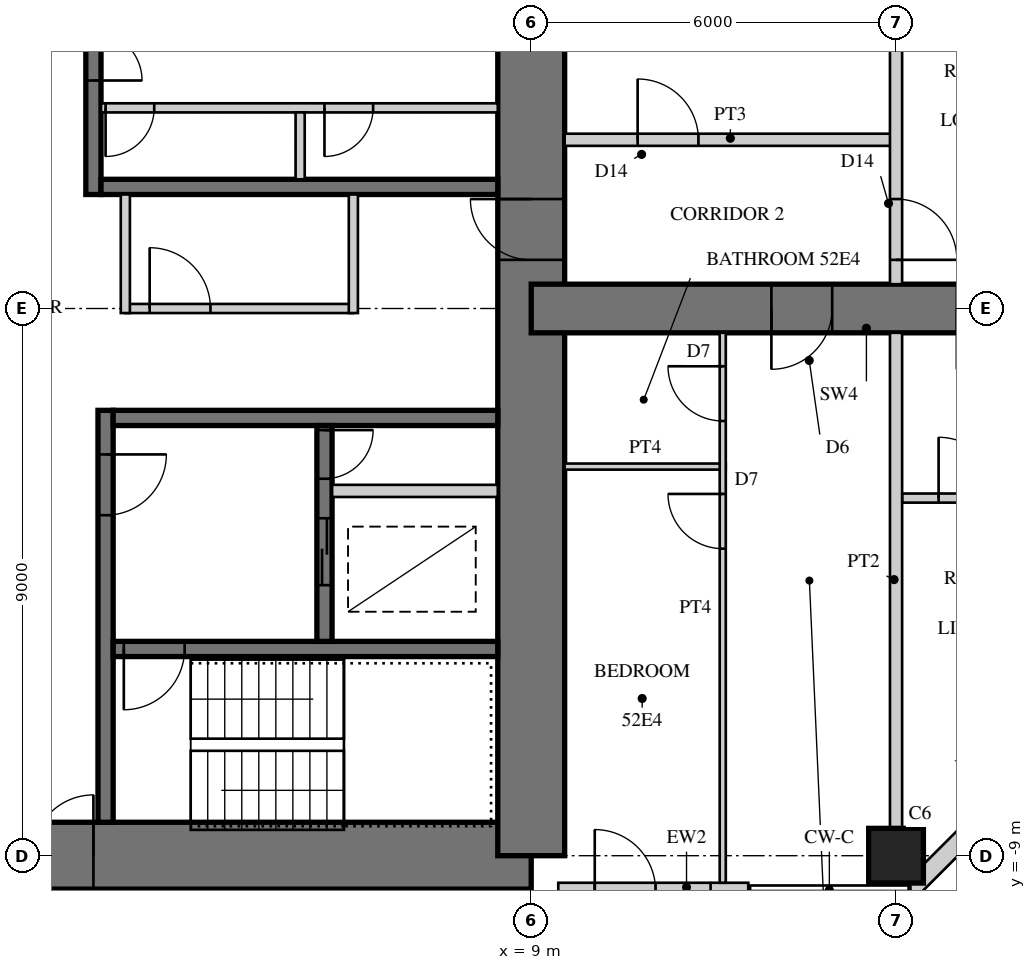
"""IFC4 building model, lengths in metres.
Left out: names, types, materials, properties, quantities, classifications, styles, units other than length and angle.
Written with IfcOpenShell. Run it as: python <this file> out.ifc"""

import sys

from ifc_helpers import new_model, si_unit, direction, frame, frame_2d, origin, origin_2d, place, context, subcontext, project, spatial, rectangle, hollow_rectangle, extrude, element, fill, save


model = new_model("IFC4")
c1 = context("Model", 3, precision=1e-05, world=origin(), true_north=direction((0.0, 1.0)))
c2 = subcontext(c1, "Body", "Model", "MODEL_VIEW")
j1 = project(units=[si_unit("LENGTHUNIT", "METRE"), si_unit("PLANEANGLEUNIT", "RADIAN")], contexts=[c1])
p1 = place(None, origin())
s1 = spatial("IfcSite", under=j1, at=p1, CompositionType="ELEMENT")
p2 = place(p1, origin())
s2 = spatial("IfcBuilding", under=s1, at=p2, CompositionType="ELEMENT")
p3 = place(p2, frame((0.0, 0.0, 206.9)))
s3 = spatial("IfcBuildingStorey", under=s2, at=p3, CompositionType="ELEMENT", Elevation=206.9)
p4 = place(p3, frame((-9.0, -9.0, 0.0), z_axis=(0.0, 0.0, 1.0), x_axis=(1.0, 0.0, 0.0)))
e1 = element("IfcWall", 1, at=p4, inside=s3, PredefinedType="SHEAR", context=c2, shape_type="SweptSolid", body=[
    extrude(rectangle(XDim=18.0, YDim=1.1, at=frame_2d((9.0, 0.0))), origin(), (0.0, 0.0, 1.0), 3.4),
])
p5 = place(p4, frame((9.8, 0.0, 0.0)))
e2 = element("IfcOpeningElement", 2, at=p5, cuts=e1, PredefinedType="OPENING", context=c2, shape_type="SweptSolid", body=[
    extrude(rectangle(XDim=1.0, YDim=2.4, at=frame_2d((0.5, 1.2))), frame((0.0, 0.56, 0.0), z_axis=(0.0, -1.0, 0.0), x_axis=(1.0, 0.0, 0.0)), (0.0, 0.0, 1.0), 1.12),
])
p6 = place(p3, frame((9.0, -9.0, 0.0), z_axis=(0.0, 0.0, 1.0), x_axis=(0.0, 1.0, 0.0)))
e3 = element("IfcWall", 3, at=p6, inside=s3, PredefinedType="SHEAR", context=c2, shape_type="SweptSolid", body=[
    extrude(rectangle(XDim=18.0, YDim=1.1, at=frame_2d((9.0, 0.0))), origin(), (0.0, 0.0, 1.0), 3.4),
])
p7 = place(p6, frame((9.8, 0.0, 0.0)))
e4 = element("IfcOpeningElement", 4, at=p7, cuts=e3, PredefinedType="OPENING", context=c2, shape_type="SweptSolid", body=[
    extrude(rectangle(XDim=1.0, YDim=2.4, at=frame_2d((0.5, 1.2))), frame((0.0, 0.56, 0.0), z_axis=(0.0, -1.0, 0.0), x_axis=(1.0, 0.0, 0.0)), (0.0, 0.0, 1.0), 1.12),
])
p8 = place(p3, frame((1.8, 1.875, 0.0), z_axis=(0.0, 0.0, 1.0), x_axis=(0.0, 1.0, 0.0)))
e5 = element("IfcWall", 5, at=p8, inside=s3, PredefinedType="SHEAR", context=c2, shape_type="SweptSolid", body=[
    extrude(rectangle(XDim=6.575, YDim=0.25, at=frame_2d((3.288, 0.0))), origin(), (0.0, 0.0, 1.0), 3.4),
])
p9 = place(p8, frame((1.875, 0.0, 0.0)))
e6 = element("IfcOpeningElement", 6, at=p9, cuts=e5, PredefinedType="OPENING", context=c2, shape_type="SweptSolid", body=[
    extrude(rectangle(XDim=1.6, YDim=2.4, at=frame_2d((0.8, 1.2))), frame((0.0, 0.135, 0.0), z_axis=(0.0, -1.0, 0.0), x_axis=(1.0, 0.0, 0.0)), (0.0, 0.0, 1.0), 0.27),
])
p10 = place(p3, frame((1.925, 2.0, 0.0), z_axis=(0.0, 0.0, 1.0), x_axis=(1.0, 0.0, 0.0)))
e7 = element("IfcWall", 7, at=p10, inside=s3, PredefinedType="SHEAR", context=c2, shape_type="SweptSolid", body=[
    extrude(rectangle(XDim=6.525, YDim=0.25, at=frame_2d((3.262, 0.0))), origin(), (0.0, 0.0, 1.0), 3.4),
])
p11 = place(p3, frame((1.925, 3.3, 0.0), z_axis=(0.0, 0.0, 1.0), x_axis=(1.0, 0.0, 0.0)))
e8 = element("IfcWall", 8, at=p11, inside=s3, PredefinedType="PARTITIONING", context=c2, shape_type="SweptSolid", body=[
    extrude(rectangle(XDim=6.525, YDim=0.15, at=frame_2d((3.262, 0.0))), origin(), (0.0, 0.0, 1.0), 3.4),
])
p12 = place(p11, frame((0.075, 0.0, 0.0)))
e9 = element("IfcOpeningElement", 9, at=p12, cuts=e8, PredefinedType="OPENING", context=c2, shape_type="SweptSolid", body=[
    extrude(rectangle(XDim=0.8, YDim=2.1, at=frame_2d((0.4, 1.05))), frame((0.0, 0.085, 0.0), z_axis=(0.0, -1.0, 0.0), x_axis=(1.0, 0.0, 0.0)), (0.0, 0.0, 1.0), 0.17),
])
p13 = place(p11, frame((3.675, 0.0, 0.0)))
e10 = element("IfcOpeningElement", 10, at=p13, cuts=e8, PredefinedType="OPENING", context=c2, shape_type="SweptSolid", body=[
    extrude(rectangle(XDim=0.8, YDim=2.1, at=frame_2d((0.4, 1.05))), frame((0.0, 0.085, 0.0), z_axis=(0.0, -1.0, 0.0), x_axis=(1.0, 0.0, 0.0)), (0.0, 0.0, 1.0), 0.17),
])
p14 = place(p3, frame((5.2, 2.125, 0.0), z_axis=(0.0, 0.0, 1.0), x_axis=(0.0, 1.0, 0.0)))
e11 = element("IfcWall", 11, at=p14, inside=s3, PredefinedType="PARTITIONING", context=c2, shape_type="SweptSolid", body=[
    extrude(rectangle(XDim=1.1, YDim=0.15, at=frame_2d((0.55, 0.0))), origin(), (0.0, 0.0, 1.0), 3.4),
])
p15 = place(p3, frame((2.0, -1.675, 0.0), z_axis=(0.0, 0.0, 1.0), x_axis=(0.0, -1.0, 0.0)))
e12 = element("IfcWall", 12, at=p15, inside=s3, PredefinedType="SHEAR", context=c2, shape_type="SweptSolid", body=[
    extrude(rectangle(XDim=6.775, YDim=0.25, at=frame_2d((3.387, 0.0))), origin(), (0.0, 0.0, 1.0), 3.4),
])
p16 = place(p15, frame((0.725, 0.0, 0.0)))
e13 = element("IfcOpeningElement", 13, at=p16, cuts=e12, PredefinedType="OPENING", context=c2, shape_type="SweptSolid", body=[
    extrude(rectangle(XDim=1.0, YDim=2.1, at=frame_2d((0.5, 1.05))), frame((0.0, 0.135, 0.0), z_axis=(0.0, -1.0, 0.0), x_axis=(1.0, 0.0, 0.0)), (0.0, 0.0, 1.0), 0.27),
])
p17 = place(p3, frame((2.125, -1.8, 0.0), z_axis=(0.0, 0.0, 1.0), x_axis=(1.0, 0.0, 0.0)))
e14 = element("IfcWall", 14, at=p17, inside=s3, PredefinedType="SHEAR", context=c2, shape_type="SweptSolid", body=[
    extrude(rectangle(XDim=6.325, YDim=0.25, at=frame_2d((3.163, 0.0))), origin(), (0.0, 0.0, 1.0), 3.4),
])
p18 = place(p3, frame((2.125, -5.6, 0.0), z_axis=(0.0, 0.0, 1.0), x_axis=(1.0, 0.0, 0.0)))
e15 = element("IfcWall", 15, at=p18, inside=s3, PredefinedType="SHEAR", context=c2, shape_type="SweptSolid", body=[
    extrude(rectangle(XDim=6.325, YDim=0.25, at=frame_2d((3.163, 0.0))), origin(), (0.0, 0.0, 1.0), 3.4),
])
p19 = place(p18, frame((0.175, 0.0, 0.0)))
e16 = element("IfcOpeningElement", 16, at=p19, cuts=e15, PredefinedType="OPENING", context=c2, shape_type="SweptSolid", body=[
    extrude(rectangle(XDim=1.0, YDim=2.1, at=frame_2d((0.5, 1.05))), frame((0.0, 0.135, 0.0), z_axis=(0.0, -1.0, 0.0), x_axis=(1.0, 0.0, 0.0)), (0.0, 0.0, 1.0), 0.27),
])
p20 = place(p3, frame((5.6, -1.925, 0.0), z_axis=(0.0, 0.0, 1.0), x_axis=(0.0, -1.0, 0.0)))
e17 = element("IfcWall", 17, at=p20, inside=s3, PredefinedType="SHEAR", context=c2, shape_type="SweptSolid", body=[
    extrude(rectangle(XDim=3.55, YDim=0.25, at=frame_2d((1.775, 0.0))), origin(), (0.0, 0.0, 1.0), 3.4),
])
p21 = place(p20, frame((1.525, 0.0, 0.0)))
e18 = element("IfcOpeningElement", 18, at=p21, cuts=e17, PredefinedType="OPENING", context=c2, shape_type="SweptSolid", body=[
    extrude(rectangle(XDim=1.1, YDim=2.2, at=frame_2d((0.55, 1.1))), frame((0.0, 0.135, 0.0), z_axis=(0.0, -1.0, 0.0), x_axis=(1.0, 0.0, 0.0)), (0.0, 0.0, 1.0), 0.27),
])
p22 = place(p20, frame((0.075, 0.0, 0.0)))
e19 = element("IfcOpeningElement", 19, at=p22, cuts=e17, PredefinedType="OPENING", context=c2, shape_type="SweptSolid", body=[
    extrude(rectangle(XDim=0.8, YDim=2.1, at=frame_2d((0.4, 1.05))), frame((0.0, 0.135, 0.0), z_axis=(0.0, -1.0, 0.0), x_axis=(1.0, 0.0, 0.0)), (0.0, 0.0, 1.0), 0.27),
])
p23 = place(p3, frame((5.725, -3.0, 0.0), z_axis=(0.0, 0.0, 1.0), x_axis=(1.0, 0.0, 0.0)))
e20 = element("IfcWall", 20, at=p23, inside=s3, PredefinedType="PARTITIONING", context=c2, shape_type="SweptSolid", body=[
    extrude(rectangle(XDim=2.725, YDim=0.2, at=frame_2d((1.362, 0.0))), origin(), (0.0, 0.0, 1.0), 3.4),
])
p24 = place(p3, frame((9.0, 0.0, 0.0), z_axis=(0.0, 0.0, 1.0), x_axis=(1.0, 0.0, 0.0)))
e21 = element("IfcWall", 21, at=p24, inside=s3, PredefinedType="SHEAR", context=c2, shape_type="SweptSolid", body=[
    extrude(rectangle(XDim=9.0, YDim=0.8, at=frame_2d((4.5, 0.0))), origin(), (0.0, 0.0, 1.0), 3.4),
])
p25 = place(p24, frame((3.95, 0.0, 0.0)))
e22 = element("IfcOpeningElement", 22, at=p25, cuts=e21, PredefinedType="OPENING", context=c2, shape_type="SweptSolid", body=[
    extrude(rectangle(XDim=1.0, YDim=2.15, at=frame_2d((0.5, 1.075))), frame((0.0, 0.41, 0.0), z_axis=(0.0, -1.0, 0.0), x_axis=(1.0, 0.0, 0.0)), (0.0, 0.0, 1.0), 0.82),
])
p26 = place(p24, frame((7.0, 0.0, 0.0)))
e23 = element("IfcOpeningElement", 23, at=p26, cuts=e21, PredefinedType="OPENING", context=c2, shape_type="SweptSolid", body=[
    extrude(rectangle(XDim=1.0, YDim=2.2, at=frame_2d((0.5, 1.1))), frame((0.0, 0.41, 0.0), z_axis=(0.0, -1.0, 0.0), x_axis=(1.0, 0.0, 0.0)), (0.0, 0.0, 1.0), 0.82),
])
p27 = place(p3, frame((15.0, -9.0, 0.0), z_axis=(0.0, 0.0, 1.0), x_axis=(1.0, 0.0, 0.0)))
e24 = element("IfcColumn", 24, at=p27, inside=s3, PredefinedType="COLUMN", context=c2, shape_type="SweptSolid", body=[
    extrude(rectangle(XDim=0.9, YDim=0.9, at=origin_2d()), origin(), (0.0, 0.0, 1.0), 3.4),
])
p28 = place(p3, frame((9.445, -9.57, 0.0), z_axis=(0.0, 0.0, 1.0), x_axis=(1.0, 0.0, 0.0)))
e25 = element("IfcWall", 25, at=p28, inside=s3, PredefinedType="SOLIDWALL", context=c2, shape_type="SweptSolid", body=[
    extrude(rectangle(XDim=3.125, YDim=0.25, at=frame_2d((1.562, 0.0))), origin(), (0.0, 0.0, 1.0), 3.22),
])
p29 = place(p28, frame((0.6, 0.0, 0.0)))
e26 = element("IfcOpeningElement", 26, at=p29, cuts=e25, PredefinedType="OPENING", context=c2, shape_type="SweptSolid", body=[
    extrude(rectangle(XDim=1.0, YDim=2.2, at=frame_2d((0.5, 1.1))), frame((0.0, 0.135, 0.0), z_axis=(0.0, -1.0, 0.0), x_axis=(1.0, 0.0, 0.0)), (0.0, 0.0, 1.0), 0.27),
])
p30 = place(p3, frame((15.236, -9.57, 0.0), z_axis=(0.0, 0.0, 1.0), x_axis=(0.707106781187, 0.707106781187, 0.0)))
e27 = element("IfcWall", 27, at=p30, inside=s3, PredefinedType="SOLIDWALL", context=c2, shape_type="SweptSolid", body=[
    extrude(rectangle(XDim=4.715, YDim=0.3, at=frame_2d((2.357, 0.0))), origin(), (0.0, 0.0, 1.0), 3.22),
])
p31 = place(p30, frame((1.907, 0.0, 0.3)))
e28 = element("IfcOpeningElement", 28, at=p31, cuts=e27, PredefinedType="OPENING", context=c2, shape_type="SweptSolid", body=[
    extrude(rectangle(XDim=0.9, YDim=2.4, at=frame_2d((0.45, 1.2))), frame((0.0, 0.16, 0.0), z_axis=(0.0, -1.0, 0.0), x_axis=(1.0, 0.0, 0.0)), (0.0, 0.0, 1.0), 0.32),
])
p32 = place(p3, frame((2.325, 0.0, 0.0), z_axis=(0.0, 0.0, 1.0), x_axis=(1.0, 0.0, 0.0)))
e29 = element("IfcWall", 29, at=p32, inside=s3, PredefinedType="PARTITIONING", context=c2, shape_type="SweptSolid", body=[
    extrude(rectangle(XDim=3.75, YDim=0.15, at=frame_2d((1.875, 0.0))), origin(), (0.0, 0.0, 1.0), 3.22),
])
p33 = place(p32, frame((0.4, 0.0, 0.0)))
e30 = element("IfcOpeningElement", 30, at=p33, cuts=e29, PredefinedType="OPENING", context=c2, shape_type="SweptSolid", body=[
    extrude(rectangle(XDim=1.0, YDim=2.1, at=frame_2d((0.5, 1.05))), frame((0.0, 0.085, 0.0), z_axis=(0.0, -1.0, 0.0), x_axis=(1.0, 0.0, 0.0)), (0.0, 0.0, 1.0), 0.17),
])
for number, where, z_axis, x_axis in (
    (31, (2.325, 1.875, 0.0), (0.0, 0.0, 1.0), (0.0, -1.0, 0.0)),
    (32, (6.075, -0.075, 0.0), (0.0, 0.0, 1.0), (0.0, 1.0, 0.0)),
):
    element("IfcWall", number, at=place(p3, frame(where, z_axis=z_axis, x_axis=x_axis)), inside=s3, PredefinedType="PARTITIONING", context=c2, shape_type="SweptSolid", body=[
        extrude(rectangle(XDim=1.95, YDim=0.15, at=frame_2d((0.975, 0.0))), origin(), (0.0, 0.0, 1.0), 3.22),
    ])
p34 = place(p3, frame((9.55, -2.6, 0.0), z_axis=(0.0, 0.0, 1.0), x_axis=(1.0, 0.0, 0.0)))
e33 = element("IfcWall", 33, at=p34, inside=s3, PredefinedType="PARTITIONING", context=c2, shape_type="SweptSolid", body=[
    extrude(rectangle(XDim=2.65, YDim=0.1, at=frame_2d((1.325, 0.0))), origin(), (0.0, 0.0, 1.0), 3.22),
])
p35 = place(p3, frame((12.15, -9.445, 0.0), z_axis=(0.0, 0.0, 1.0), x_axis=(0.0, 1.0, 0.0)))
e34 = element("IfcWall", 34, at=p35, inside=s3, PredefinedType="PARTITIONING", context=c2, shape_type="SweptSolid", body=[
    extrude(rectangle(XDim=9.045, YDim=0.1, at=frame_2d((4.522, 0.0))), origin(), (0.0, 0.0, 1.0), 3.22),
])
p36 = place(p35, frame((5.495, 0.0, 0.0)))
e35 = element("IfcOpeningElement", 35, at=p36, cuts=e34, PredefinedType="OPENING", context=c2, shape_type="SweptSolid", body=[
    extrude(rectangle(XDim=0.9, YDim=2.1, at=frame_2d((0.45, 1.05))), frame((0.0, 0.06, 0.0), z_axis=(0.0, -1.0, 0.0), x_axis=(1.0, 0.0, 0.0)), (0.0, 0.0, 1.0), 0.12),
])
p37 = place(p35, frame((7.595, 0.0, 0.0)))
e36 = element("IfcOpeningElement", 36, at=p37, cuts=e34, PredefinedType="OPENING", context=c2, shape_type="SweptSolid", body=[
    extrude(rectangle(XDim=0.9, YDim=2.1, at=frame_2d((0.45, 1.05))), frame((0.0, 0.06, 0.0), z_axis=(0.0, -1.0, 0.0), x_axis=(1.0, 0.0, 0.0)), (0.0, 0.0, 1.0), 0.12),
])
p38 = place(p3, frame((9.55, 2.775, 0.0), z_axis=(0.0, 0.0, 1.0), x_axis=(1.0, 0.0, 0.0)))
e37 = element("IfcWall", 37, at=p38, inside=s3, PredefinedType="SOLIDWALL", context=c2, shape_type="SweptSolid", body=[
    extrude(rectangle(XDim=5.45, YDim=0.2, at=frame_2d((2.725, 0.0))), origin(), (0.0, 0.0, 1.0), 3.22),
])
p39 = place(p38, frame((1.2, 0.0, 0.0)))
e38 = element("IfcOpeningElement", 38, at=p39, cuts=e37, PredefinedType="OPENING", context=c2, shape_type="SweptSolid", body=[
    extrude(rectangle(XDim=1.0, YDim=2.2, at=frame_2d((0.5, 1.1))), frame((0.0, 0.11, 0.0), z_axis=(0.0, -1.0, 0.0), x_axis=(1.0, 0.0, 0.0)), (0.0, 0.0, 1.0), 0.22),
])
p40 = place(p3, frame((15.1, -3.118, 0.0), z_axis=(0.0, 0.0, 1.0), x_axis=(1.0, 0.0, 0.0)))
e39 = element("IfcWall", 39, at=p40, inside=s3, PredefinedType="PARTITIONING", context=c2, shape_type="SweptSolid", body=[
    extrude(rectangle(XDim=3.43, YDim=0.15, at=frame_2d((1.715, 0.0))), origin(), (0.0, 0.0, 1.0), 3.22),
])
p41 = place(p40, frame((0.6, 0.0, 0.0)))
e40 = element("IfcOpeningElement", 40, at=p41, cuts=e39, PredefinedType="OPENING", context=c2, shape_type="SweptSolid", body=[
    extrude(rectangle(XDim=1.0, YDim=2.1, at=frame_2d((0.5, 1.05))), frame((0.0, 0.085, 0.0), z_axis=(0.0, -1.0, 0.0), x_axis=(1.0, 0.0, 0.0)), (0.0, 0.0, 1.0), 0.17),
])
p42 = place(p3, frame((15.0, -8.55, 0.0), z_axis=(0.0, 0.0, 1.0), x_axis=(0.0, 1.0, 0.0)))
e41 = element("IfcWall", 41, at=p42, inside=s3, PredefinedType="SOLIDWALL", context=c2, shape_type="SweptSolid", body=[
    extrude(rectangle(XDim=8.15, YDim=0.2, at=frame_2d((4.075, 0.0))), origin(), (0.0, 0.0, 1.0), 2.47),
])
p43 = place(p3, frame((15.0, 0.4, 0.0), z_axis=(0.0, 0.0, 1.0), x_axis=(0.0, 1.0, 0.0)))
e42 = element("IfcWall", 42, at=p43, inside=s3, PredefinedType="SOLIDWALL", context=c2, shape_type="SweptSolid", body=[
    extrude(rectangle(XDim=8.15, YDim=0.2, at=frame_2d((4.075, 0.0))), origin(), (0.0, 0.0, 1.0), 2.47),
])
p44 = place(p43, frame((0.4, 0.0, 0.0)))
e43 = element("IfcOpeningElement", 43, at=p44, cuts=e42, PredefinedType="OPENING", context=c2, shape_type="SweptSolid", body=[
    extrude(rectangle(XDim=1.0, YDim=2.2, at=frame_2d((0.5, 1.1))), frame((0.0, 0.11, 0.0), z_axis=(0.0, -1.0, 0.0), x_axis=(1.0, 0.0, 0.0)), (0.0, 0.0, 1.0), 0.22),
])
p45 = place(p29, origin())
e44 = element("IfcDoor", 44, at=p45, inside=s3, OperationType="SINGLE_SWING_LEFT", PredefinedType="DOOR", context=c2, shape_type="SweptSolid", body=[
    extrude(hollow_rectangle(XDim=1.0, YDim=2.2, WallThickness=0.06, at=frame_2d((0.5, 1.1))), frame((0.0, 0.025, 0.0), z_axis=(0.0, -1.0, 0.0), x_axis=(1.0, 0.0, 0.0)), (0.0, 0.0, 1.0), 0.05),
    extrude(rectangle(XDim=0.879, YDim=2.079, at=frame_2d((0.5, 1.1))), frame((0.0, 0.025, 0.0), z_axis=(0.0, -1.0, 0.0), x_axis=(1.0, 0.0, 0.0)), (0.0, 0.0, 1.0), 0.05),
])
fill(e26, e44)
p46 = place(p33, origin())
e45 = element("IfcDoor", 45, at=p46, inside=s3, OperationType="SINGLE_SWING_LEFT", PredefinedType="DOOR", context=c2, shape_type="SweptSolid", body=[
    extrude(rectangle(XDim=1.0, YDim=2.1, at=frame_2d((0.5, 1.05))), frame((0.0, 0.025, 0.0), z_axis=(0.0, -1.0, 0.0), x_axis=(1.0, 0.0, 0.0)), (0.0, 0.0, 1.0), 0.05),
])
fill(e30, e45)
p47 = place(p36, origin())
e46 = element("IfcDoor", 46, at=p47, inside=s3, OperationType="SINGLE_SWING_RIGHT", PredefinedType="DOOR", context=c2, shape_type="SweptSolid", body=[
    extrude(rectangle(XDim=0.9, YDim=2.1, at=frame_2d((0.45, 1.05))), frame((0.0, 0.025, 0.0), z_axis=(0.0, -1.0, 0.0), x_axis=(1.0, 0.0, 0.0)), (0.0, 0.0, 1.0), 0.05),
])
fill(e35, e46)
p48 = place(p37, origin())
e47 = element("IfcDoor", 47, at=p48, inside=s3, OperationType="SINGLE_SWING_RIGHT", PredefinedType="DOOR", context=c2, shape_type="SweptSolid", body=[
    extrude(rectangle(XDim=0.9, YDim=2.1, at=frame_2d((0.45, 1.05))), frame((0.0, 0.025, 0.0), z_axis=(0.0, -1.0, 0.0), x_axis=(1.0, 0.0, 0.0)), (0.0, 0.0, 1.0), 0.05),
])
fill(e36, e47)
p49 = place(p39, origin())
e48 = element("IfcDoor", 48, at=p49, inside=s3, OperationType="SINGLE_SWING_LEFT", PredefinedType="DOOR", context=c2, shape_type="SweptSolid", body=[
    extrude(rectangle(XDim=1.0, YDim=2.2, at=frame_2d((0.5, 1.1))), frame((0.0, 0.025, 0.0), z_axis=(0.0, -1.0, 0.0), x_axis=(1.0, 0.0, 0.0)), (0.0, 0.0, 1.0), 0.05),
])
fill(e38, e48)
p50 = place(p41, origin())
e49 = element("IfcDoor", 49, at=p50, inside=s3, OperationType="SINGLE_SWING_LEFT", PredefinedType="DOOR", context=c2, shape_type="SweptSolid", body=[
    extrude(rectangle(XDim=1.0, YDim=2.1, at=frame_2d((0.5, 1.05))), frame((0.0, 0.025, 0.0), z_axis=(0.0, -1.0, 0.0), x_axis=(1.0, 0.0, 0.0)), (0.0, 0.0, 1.0), 0.05),
])
fill(e40, e49)
p51 = place(p44, frame((1.0, 0.0, 0.0), z_axis=(0.0, 0.0, 1.0), x_axis=(-1.0, 0.0, 0.0)))
e50 = element("IfcDoor", 50, at=p51, inside=s3, OperationType="SINGLE_SWING_RIGHT", PredefinedType="DOOR", context=c2, shape_type="SweptSolid", body=[
    extrude(rectangle(XDim=1.0, YDim=2.2, at=frame_2d((0.5, 1.1))), frame((0.0, 0.025, 0.0), z_axis=(0.0, -1.0, 0.0), x_axis=(1.0, 0.0, 0.0)), (0.0, 0.0, 1.0), 0.05),
])
fill(e43, e50)
p52 = place(p25, frame((1.0, 0.0, 0.0), z_axis=(0.0, 0.0, 1.0), x_axis=(-1.0, 0.0, 0.0)))
e51 = element("IfcDoor", 51, at=p52, inside=s3, OperationType="SINGLE_SWING_RIGHT", PredefinedType="DOOR", context=c2, shape_type="SweptSolid", body=[
    extrude(rectangle(XDim=1.0, YDim=2.15, at=frame_2d((0.5, 1.075))), frame((0.0, 0.025, 0.0), z_axis=(0.0, -1.0, 0.0), x_axis=(1.0, 0.0, 0.0)), (0.0, 0.0, 1.0), 0.05),
])
fill(e22, e51)
p53 = place(p5, origin())
e52 = element("IfcDoor", 52, at=p53, inside=s3, OperationType="SINGLE_SWING_RIGHT", PredefinedType="DOOR", context=c2, shape_type="SweptSolid", body=[
    extrude(rectangle(XDim=1.0, YDim=2.4, at=frame_2d((0.5, 1.2))), frame((0.0, 0.055, 0.0), z_axis=(0.0, -1.0, 0.0), x_axis=(1.0, 0.0, 0.0)), (0.0, 0.0, 1.0), 0.05),
])
fill(e2, e52)
p54 = place(p7, origin())
e53 = element("IfcDoor", 53, at=p54, inside=s3, OperationType="SINGLE_SWING_RIGHT", PredefinedType="DOOR", context=c2, shape_type="SweptSolid", body=[
    extrude(rectangle(XDim=1.0, YDim=2.4, at=frame_2d((0.5, 1.2))), frame((0.0, 0.055, 0.0), z_axis=(0.0, -1.0, 0.0), x_axis=(1.0, 0.0, 0.0)), (0.0, 0.0, 1.0), 0.05),
])
fill(e4, e53)
p55 = place(p9, frame((1.6, 0.0, 0.0), z_axis=(0.0, 0.0, 1.0), x_axis=(-1.0, 0.0, 0.0)))
e54 = element("IfcDoor", 54, at=p55, inside=s3, OperationType="DOUBLE_DOOR_SINGLE_SWING", PredefinedType="DOOR", context=c2, shape_type="SweptSolid", body=[
    extrude(rectangle(XDim=1.6, YDim=2.4, at=frame_2d((0.8, 1.2))), frame((0.0, 0.025, 0.0), z_axis=(0.0, -1.0, 0.0), x_axis=(1.0, 0.0, 0.0)), (0.0, 0.0, 1.0), 0.05),
])
fill(e6, e54)
p56 = place(p12, frame((0.8, 0.0, 0.0), z_axis=(0.0, 0.0, 1.0), x_axis=(-1.0, 0.0, 0.0)))
e55 = element("IfcDoor", 55, at=p56, inside=s3, OperationType="SINGLE_SWING_RIGHT", PredefinedType="DOOR", context=c2, shape_type="SweptSolid", body=[
    extrude(rectangle(XDim=0.8, YDim=2.1, at=frame_2d((0.4, 1.05))), frame((0.0, 0.025, 0.0), z_axis=(0.0, -1.0, 0.0), x_axis=(1.0, 0.0, 0.0)), (0.0, 0.0, 1.0), 0.05),
])
fill(e9, e55)
p57 = place(p13, frame((0.8, 0.0, 0.0), z_axis=(0.0, 0.0, 1.0), x_axis=(-1.0, 0.0, 0.0)))
e56 = element("IfcDoor", 56, at=p57, inside=s3, OperationType="SINGLE_SWING_RIGHT", PredefinedType="DOOR", context=c2, shape_type="SweptSolid", body=[
    extrude(rectangle(XDim=0.8, YDim=2.1, at=frame_2d((0.4, 1.05))), frame((0.0, 0.025, 0.0), z_axis=(0.0, -1.0, 0.0), x_axis=(1.0, 0.0, 0.0)), (0.0, 0.0, 1.0), 0.05),
])
fill(e10, e56)
p58 = place(p16, origin())
e57 = element("IfcDoor", 57, at=p58, inside=s3, OperationType="SINGLE_SWING_LEFT", PredefinedType="DOOR", context=c2, shape_type="SweptSolid", body=[
    extrude(rectangle(XDim=1.0, YDim=2.1, at=frame_2d((0.5, 1.05))), frame((0.0, 0.025, 0.0), z_axis=(0.0, -1.0, 0.0), x_axis=(1.0, 0.0, 0.0)), (0.0, 0.0, 1.0), 0.05),
])
fill(e13, e57)
p59 = place(p19, frame((1.0, 0.0, 0.0), z_axis=(0.0, 0.0, 1.0), x_axis=(-1.0, 0.0, 0.0)))
e58 = element("IfcDoor", 58, at=p59, inside=s3, OperationType="SINGLE_SWING_RIGHT", PredefinedType="DOOR", context=c2, shape_type="SweptSolid", body=[
    extrude(rectangle(XDim=1.0, YDim=2.1, at=frame_2d((0.5, 1.05))), frame((0.0, 0.025, 0.0), z_axis=(0.0, -1.0, 0.0), x_axis=(1.0, 0.0, 0.0)), (0.0, 0.0, 1.0), 0.05),
])
fill(e16, e58)
p60 = place(p21, origin())
e59 = element("IfcDoor", 59, at=p60, inside=s3, OperationType="DOUBLE_DOOR_SLIDING", PredefinedType="DOOR", context=c2, shape_type="SweptSolid", body=[
    extrude(rectangle(XDim=1.1, YDim=2.2, at=frame_2d((0.55, 1.1))), frame((0.0, 0.025, 0.0), z_axis=(0.0, -1.0, 0.0), x_axis=(1.0, 0.0, 0.0)), (0.0, 0.0, 1.0), 0.05),
])
fill(e18, e59)
p61 = place(p22, origin())
e60 = element("IfcDoor", 60, at=p61, inside=s3, OperationType="SINGLE_SWING_LEFT", PredefinedType="DOOR", context=c2, shape_type="SweptSolid", body=[
    extrude(rectangle(XDim=0.8, YDim=2.1, at=frame_2d((0.4, 1.05))), frame((0.0, 0.025, 0.0), z_axis=(0.0, -1.0, 0.0), x_axis=(1.0, 0.0, 0.0)), (0.0, 0.0, 1.0), 0.05),
])
fill(e19, e60)
save(model, sys.argv[1])
